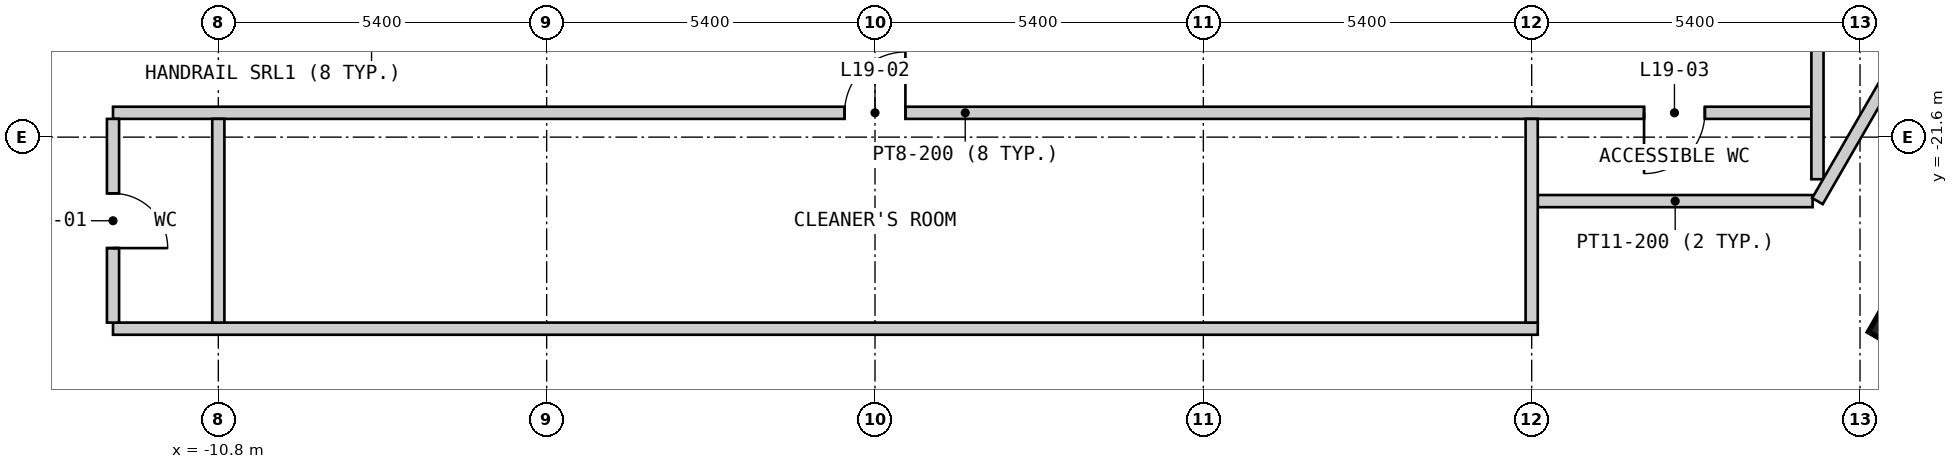
"""IFC4 building model, lengths in metres.
Left out: names, types, materials, properties, quantities, classifications, styles, units other than length and angle.
Written with IfcOpenShell. Run it as: python <this file> out.ifc"""

import sys

from ifc_helpers import new_model, si_unit, direction, frame, frame_2d, origin, origin_2d, place, context, subcontext, project, spatial, polyline, rectangle, outline, extrude, element, fill, save


model = new_model("IFC4")
c1 = context("Model", 3, precision=1e-05, world=origin(), true_north=direction((0.0, 1.0)))
c2 = subcontext(c1, "Body", "Model", "MODEL_VIEW")
j1 = project(units=[si_unit("LENGTHUNIT", "METRE"), si_unit("PLANEANGLEUNIT", "RADIAN")], contexts=[c1])
p1 = place(None, origin())
s1 = spatial("IfcSite", under=j1, at=p1, CompositionType="ELEMENT")
p2 = place(p1, origin())
s2 = spatial("IfcBuilding", under=s1, at=p2, CompositionType="ELEMENT")
p3 = place(p2, frame((0.0, 0.0, 62.4)))
s3 = spatial("IfcBuildingStorey", under=s2, at=p3, CompositionType="ELEMENT", Elevation=62.4)
p4 = place(p3, frame((17.09, -24.6, 0.0), z_axis=(0.0, 0.0, 1.0), x_axis=(0.499984884929, 0.866034130299, 0.0)))
e1 = element("IfcColumn", 1, at=p4, inside=s3, PredefinedType="COLUMN", context=c2, shape_type="SweptSolid", body=[
    extrude(rectangle(XDim=1.1, YDim=1.1, at=origin_2d()), origin(), (0.0, 0.0, 1.0), 3.6),
])
for number, where, z_axis, x_axis in (
    (2, (-17.765, -25.77, 0.0), (0.0, 0.0, 1.0), (0.866, -0.5, 0.0)),
    (3, (13.435, -28.27, 0.0), (0.0, 0.0, 1.0), (0.866, 0.5, 0.0)),
):
    element("IfcWall", number, at=place(p3, frame(where, z_axis=z_axis, x_axis=x_axis)), inside=s3, PredefinedType="SOLIDWALL", context=c2, shape_type="SweptSolid", body=[
        extrude(outline(polyline([(0.0, -0.15), (5.0, -0.15), (4.919, 0.15), (0.08, 0.15), (0.0, -0.15)])), origin(), (0.0, 0.0, 1.0), 2.6),
    ])
p5 = place(p3, frame((-12.532, -24.75, 0.0), z_axis=(0.0, 0.0, 1.0), x_axis=(1.0, 0.0, 0.0)))
e4 = element("IfcWall", 4, at=p5, inside=s3, PredefinedType="PARTITIONING", context=c2, shape_type="SweptSolid", body=[
    extrude(rectangle(XDim=23.432, YDim=0.2, at=frame_2d((11.716, 0.0))), origin(), (0.0, 0.0, 1.0), 2.6),
])
p6 = place(p3, frame((10.9, -22.652, 0.0), z_axis=(0.0, 0.0, 1.0), x_axis=(1.0, 0.0, 0.0)))
e5 = element("IfcWall", 5, at=p6, inside=s3, PredefinedType="PARTITIONING", context=c2, shape_type="SweptSolid", body=[
    extrude(rectangle(XDim=4.52, YDim=0.2, at=frame_2d((2.26, 0.0))), origin(), (0.0, 0.0, 1.0), 2.6),
])
p7 = place(p3, frame((-12.532, -21.2, 0.0), z_axis=(0.0, 0.0, 1.0), x_axis=(1.0, 0.0, 0.0)))
e6 = element("IfcWall", 6, at=p7, inside=s3, PredefinedType="PARTITIONING", context=c2, shape_type="SweptSolid", body=[
    extrude(rectangle(XDim=28.032, YDim=0.2, at=frame_2d((14.016, 0.0))), origin(), (0.0, 0.0, 1.0), 2.6),
])
p8 = place(p7, frame((13.032, 0.0, 0.0), z_axis=(0.0, 0.0, 1.0), x_axis=(-1.0, 0.0, 0.0)))
e7 = element("IfcOpeningElement", 7, at=p8, cuts=e6, PredefinedType="OPENING", context=c2, shape_type="SweptSolid", body=[
    extrude(rectangle(XDim=1.0, YDim=2.1, at=frame_2d((0.5, 1.05))), frame((0.0, 0.11, 0.0), z_axis=(0.0, -1.0, 0.0), x_axis=(1.0, 0.0, 0.0)), (0.0, 0.0, 1.0), 0.22),
])
p9 = place(p7, frame((26.18, 0.0, 0.0), z_axis=(0.0, 0.0, 1.0), x_axis=(-1.0, 0.0, 0.0)))
e8 = element("IfcOpeningElement", 8, at=p9, cuts=e6, PredefinedType="OPENING", context=c2, shape_type="SweptSolid", body=[
    extrude(rectangle(XDim=1.0, YDim=2.1, at=frame_2d((0.5, 1.05))), frame((0.0, 0.11, 0.0), z_axis=(0.0, -1.0, 0.0), x_axis=(1.0, 0.0, 0.0)), (0.0, 0.0, 1.0), 0.22),
])
p10 = place(p3, frame((-12.532, -24.65, 0.0), z_axis=(0.0, 0.0, 1.0), x_axis=(0.0, 1.0, 0.0)))
e9 = element("IfcWall", 9, at=p10, inside=s3, PredefinedType="PARTITIONING", context=c2, shape_type="SweptSolid", body=[
    extrude(rectangle(XDim=3.35, YDim=0.2, at=frame_2d((1.675, 0.0))), origin(), (0.0, 0.0, 1.0), 2.6),
])
p11 = place(p10, frame((2.125, 0.0, 0.0), z_axis=(0.0, 0.0, 1.0), x_axis=(-1.0, 0.0, 0.0)))
e10 = element("IfcOpeningElement", 10, at=p11, cuts=e9, PredefinedType="OPENING", context=c2, shape_type="SweptSolid", body=[
    extrude(rectangle(XDim=0.9, YDim=2.1, at=frame_2d((0.45, 1.05))), frame((0.0, 0.11, 0.0), z_axis=(0.0, -1.0, 0.0), x_axis=(1.0, 0.0, 0.0)), (0.0, 0.0, 1.0), 0.22),
])
for number, where, z_axis, x_axis in (
    (11, (-10.8, -24.65, 0.0), (0.0, 0.0, 1.0), (0.0, 1.0, 0.0)),
    (12, (10.8, -24.65, 0.0), (0.0, 0.0, 1.0), (0.0, 1.0, 0.0)),
):
    element("IfcWall", number, at=place(p3, frame(where, z_axis=z_axis, x_axis=x_axis)), inside=s3, PredefinedType="PARTITIONING", context=c2, shape_type="SweptSolid", body=[
        extrude(rectangle(XDim=3.35, YDim=0.2, at=frame_2d((1.675, 0.0))), origin(), (0.0, 0.0, 1.0), 2.6),
    ])
p12 = place(p3, frame((15.5, -22.292, 0.0), z_axis=(0.0, 0.0, 1.0), x_axis=(0.0, 1.0, 0.0)))
e13 = element("IfcWall", 13, at=p12, inside=s3, PredefinedType="SOLIDWALL", context=c2, shape_type="SweptSolid", body=[
    extrude(rectangle(XDim=10.698, YDim=0.2, at=frame_2d((5.349, 0.0))), origin(), (0.0, 0.0, 1.0), 2.6),
])
p13 = place(p12, frame((6.445, 0.0, 0.0), z_axis=(0.0, 0.0, 1.0), x_axis=(-1.0, 0.0, 0.0)))
e14 = element("IfcOpeningElement", 14, at=p13, cuts=e13, PredefinedType="OPENING", context=c2, shape_type="SweptSolid", body=[
    extrude(rectangle(XDim=1.0, YDim=2.1, at=frame_2d((0.5, 1.05))), frame((0.0, 0.11, 0.0), z_axis=(0.0, -1.0, 0.0), x_axis=(1.0, 0.0, 0.0)), (0.0, 0.0, 1.0), 0.22),
])
p14 = place(p3, frame((15.5, -22.652, 0.0), z_axis=(0.0, 0.0, 1.0), x_axis=(0.499972322153, 0.866041383007, 0.0)))
e15 = element("IfcWall", 15, at=p14, inside=s3, PredefinedType="SOLIDWALL", context=c2, shape_type="SweptSolid", body=[
    extrude(rectangle(XDim=15.591, YDim=0.2, at=frame_2d((7.795, 0.0))), origin(), (0.0, 0.0, 1.0), 2.6),
])
p15 = place(p11, origin())
e16 = element("IfcDoor", 16, at=p15, inside=s3, OperationType="SINGLE_SWING_RIGHT", PredefinedType="DOOR", context=c2, shape_type="SweptSolid", body=[
    extrude(rectangle(XDim=0.9, YDim=2.1, at=frame_2d((0.45, 1.05))), frame((0.0, 0.025, 0.0), z_axis=(0.0, -1.0, 0.0), x_axis=(1.0, 0.0, 0.0)), (0.0, 0.0, 1.0), 0.05),
])
fill(e10, e16)
p16 = place(p8, origin())
e17 = element("IfcDoor", 17, at=p16, inside=s3, OperationType="SINGLE_SWING_LEFT", PredefinedType="DOOR", context=c2, shape_type="SweptSolid", body=[
    extrude(rectangle(XDim=1.0, YDim=2.1, at=frame_2d((0.5, 1.05))), frame((0.0, 0.025, 0.0), z_axis=(0.0, -1.0, 0.0), x_axis=(1.0, 0.0, 0.0)), (0.0, 0.0, 1.0), 0.05),
])
fill(e7, e17)
p17 = place(p9, origin())
e18 = element("IfcDoor", 18, at=p17, inside=s3, OperationType="SINGLE_SWING_RIGHT", PredefinedType="DOOR", context=c2, shape_type="SweptSolid", body=[
    extrude(rectangle(XDim=1.0, YDim=2.1, at=frame_2d((0.5, 1.05))), frame((0.0, 0.025, 0.0), z_axis=(0.0, -1.0, 0.0), x_axis=(1.0, 0.0, 0.0)), (0.0, 0.0, 1.0), 0.05),
])
fill(e8, e18)
save(model, sys.argv[1])
